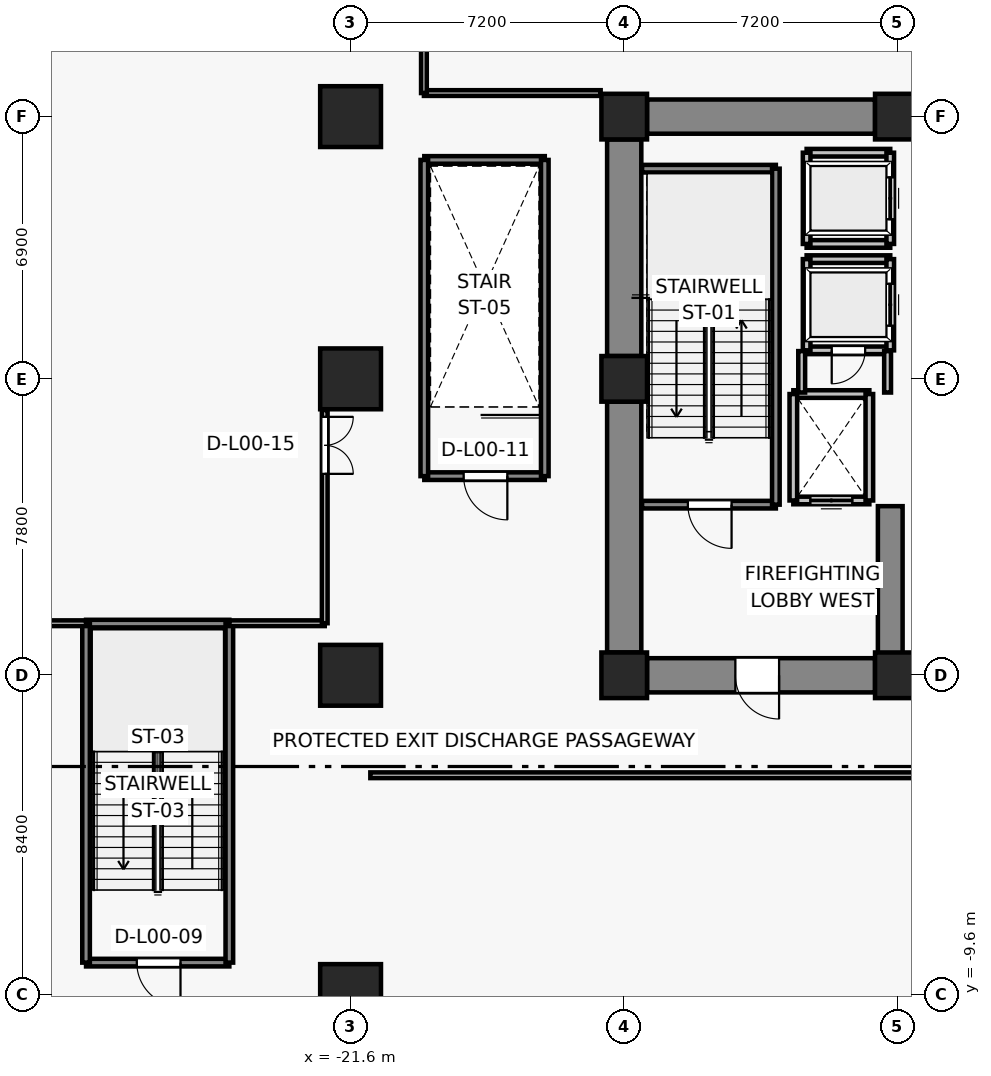
"""IFC4 building model, lengths in metres.
Left out: names, types, materials, properties, quantities, classifications, styles, units other than length and angle.
Written with IfcOpenShell. Run it as: python <this file> out.ifc"""

import sys

from ifc_helpers import new_model, si_unit, direction, frame, frame_2d, origin, origin_2d, place, context, subcontext, project, spatial, rectangle, extrude, source, transform, mapped, element, fill, save


model = new_model("IFC4")
c1 = context("Model", 3, precision=1e-05, world=origin(), true_north=direction((0.0, 1.0)))
c2 = subcontext(c1, "Body", "Model", "MODEL_VIEW")
j1 = project(units=[si_unit("LENGTHUNIT", "METRE"), si_unit("PLANEANGLEUNIT", "RADIAN")], contexts=[c1])
p1 = place(None, origin())
s1 = spatial("IfcSite", under=j1, at=p1, CompositionType="ELEMENT")
p2 = place(p1, origin())
s2 = spatial("IfcBuilding", under=s1, at=p2, CompositionType="ELEMENT")
p3 = place(p2, origin())
s3 = spatial("IfcBuildingStorey", under=s2, at=p3, CompositionType="ELEMENT", Elevation=0.0)
for number, where, z_axis, x_axis in (
    (1, (-14.4, -1.2, 0.0), (0.0, 0.0, 1.0), (1.0, 0.0, 0.0)),
    (2, (-7.2, -1.2, 0.0), (0.0, 0.0, 1.0), (1.0, 0.0, 0.0)),
    (3, (-14.4, 6.6, 0.0), (0.0, 0.0, 1.0), (1.0, 0.0, 0.0)),
    (4, (-14.4, 13.5, 0.0), (0.0, 0.0, 1.0), (1.0, 0.0, 0.0)),
    (5, (-7.2, 13.5, 0.0), (0.0, 0.0, 1.0), (1.0, 0.0, 0.0)),
):
    element("IfcColumn", number, at=place(p3, frame(where, z_axis=z_axis, x_axis=x_axis)), inside=s3, PredefinedType="COLUMN", context=c2, shape_type="SweptSolid", body=[
        extrude(rectangle(XDim=1.2, YDim=1.2, at=origin_2d()), origin(), (0.0, 0.0, 1.0), 5.0),
    ])
for number, where, z_axis, x_axis in (
    (6, (-21.6, -9.6, 0.0), (0.0, 0.0, 1.0), (1.0, 0.0, 0.0)),
    (7, (-21.6, -1.2, 0.0), (0.0, 0.0, 1.0), (1.0, 0.0, 0.0)),
    (8, (-21.6, 6.6, 0.0), (0.0, 0.0, 1.0), (1.0, 0.0, 0.0)),
    (9, (-21.6, 13.5, 0.0), (0.0, 0.0, 1.0), (1.0, 0.0, 0.0)),
):
    element("IfcColumn", number, at=place(p3, frame(where, z_axis=z_axis, x_axis=x_axis)), inside=s3, PredefinedType="COLUMN", context=c2, shape_type="SweptSolid", body=[
        extrude(rectangle(XDim=1.6, YDim=1.6, at=origin_2d()), origin(), (0.0, 0.0, 1.0), 5.0),
    ])
p4 = place(p3, frame((-13.8, 13.5, 0.0), z_axis=(0.0, 0.0, 1.0), x_axis=(1.0, 0.0, 0.0)))
e10 = element("IfcWall", 10, at=p4, inside=s3, PredefinedType="SHEAR", context=c2, shape_type="SweptSolid", body=[
    extrude(rectangle(XDim=6.0, YDim=0.9, at=frame_2d((3.0, 0.0))), origin(), (0.0, 0.0, 1.0), 4.7),
])
p5 = place(p3, frame((-14.4, -0.6, 0.0), z_axis=(0.0, 0.0, 1.0), x_axis=(0.0, 1.0, 0.0)))
e11 = element("IfcWall", 11, at=p5, inside=s3, PredefinedType="SHEAR", context=c2, shape_type="SweptSolid", body=[
    extrude(rectangle(XDim=6.6, YDim=0.9, at=frame_2d((3.3, 0.0))), origin(), (0.0, 0.0, 1.0), 4.7),
])
p6 = place(p3, frame((-14.4, 7.2, 0.0), z_axis=(0.0, 0.0, 1.0), x_axis=(0.0, 1.0, 0.0)))
e12 = element("IfcWall", 12, at=p6, inside=s3, PredefinedType="SHEAR", context=c2, shape_type="SweptSolid", body=[
    extrude(rectangle(XDim=5.7, YDim=0.9, at=frame_2d((2.85, 0.0))), origin(), (0.0, 0.0, 1.0), 4.7),
])
p7 = place(p3, frame((-7.8, -1.2, 0.0), z_axis=(0.0, 0.0, 1.0), x_axis=(-1.0, 0.0, 0.0)))
e13 = element("IfcWall", 13, at=p7, inside=s3, PredefinedType="SHEAR", context=c2, shape_type="SweptSolid", body=[
    extrude(rectangle(XDim=6.0, YDim=0.9, at=frame_2d((3.0, 0.0))), origin(), (0.0, 0.0, 1.0), 4.7),
])
p8 = place(p7, frame((2.525, 0.0, 0.0)))
e14 = element("IfcOpeningElement", 14, at=p8, cuts=e13, PredefinedType="OPENING", context=c2, shape_type="SweptSolid", body=[
    extrude(rectangle(XDim=1.15, YDim=2.15, at=frame_2d((0.575, 1.075))), frame((0.0, 0.46, 0.0), z_axis=(0.0, -1.0, 0.0), x_axis=(1.0, 0.0, 0.0)), (0.0, 0.0, 1.0), 0.92),
])
p9 = place(p3, frame((-7.4, -0.75, 0.0), z_axis=(0.0, 0.0, 1.0), x_axis=(0.0, 1.0, 0.0)))
e15 = element("IfcWall", 15, at=p9, inside=s3, PredefinedType="SHEAR", context=c2, shape_type="SweptSolid", body=[
    extrude(rectangle(XDim=4.0, YDim=0.65, at=frame_2d((2.0, 0.0))), origin(), (0.0, 0.0, 1.0), 4.7),
])
p10 = place(p3, frame((-7.95, 3.4, 0.0), z_axis=(0.0, 0.0, 1.0), x_axis=(-1.0, 0.0, 0.0)))
e16 = element("IfcWall", 16, at=p10, inside=s3, PredefinedType="SOLIDWALL", context=c2, shape_type="SweptSolid", body=[
    extrude(rectangle(XDim=2.0, YDim=0.2, at=frame_2d((1.0, 0.0))), origin(), (0.0, 0.0, 1.0), 4.7),
])
p11 = place(p10, frame((0.45, 0.0, 0.0)))
e17 = element("IfcOpeningElement", 17, at=p11, cuts=e16, PredefinedType="OPENING", context=c2, shape_type="SweptSolid", body=[
    extrude(rectangle(XDim=1.1, YDim=2.2, at=frame_2d((0.55, 1.1))), frame((0.0, 0.11, 0.0), z_axis=(0.0, -1.0, 0.0), x_axis=(1.0, 0.0, 0.0)), (0.0, 0.0, 1.0), 0.22),
])
p12 = place(p3, frame((-9.95, 6.2, 0.0), z_axis=(0.0, 0.0, 1.0), x_axis=(1.0, 0.0, 0.0)))
e18 = element("IfcWall", 18, at=p12, inside=s3, PredefinedType="SOLIDWALL", context=c2, shape_type="SweptSolid", body=[
    extrude(rectangle(XDim=2.0, YDim=0.2, at=frame_2d((1.0, 0.0))), origin(), (0.0, 0.0, 1.0), 4.7),
])
for number, where, z_axis, x_axis in (
    (19, (-9.95, 3.4, 0.0), (0.0, 0.0, 1.0), (0.0, 1.0, 0.0)),
    (20, (-7.95, 6.2, 0.0), (0.0, 0.0, 1.0), (0.0, -1.0, 0.0)),
):
    element("IfcWall", number, at=place(p3, frame(where, z_axis=z_axis, x_axis=x_axis)), inside=s3, PredefinedType="SOLIDWALL", context=c2, shape_type="SweptSolid", body=[
        extrude(rectangle(XDim=2.8, YDim=0.2, at=frame_2d((1.4, 0.0))), origin(), (0.0, 0.0, 1.0), 4.7),
    ])
p13 = place(p3, frame((-7.4, 7.35, 0.0), z_axis=(0.0, 0.0, 1.0), x_axis=(-1.0, 0.0, 0.0)))
e21 = element("IfcWall", 21, at=p13, inside=s3, PredefinedType="SOLIDWALL", context=c2, shape_type="SweptSolid", body=[
    extrude(rectangle(XDim=2.2, YDim=0.2, at=frame_2d((1.1, 0.0))), origin(), (0.0, 0.0, 1.0), 3.79),
])
p14 = place(p13, frame((0.66, 0.0, 0.0)))
e22 = element("IfcOpeningElement", 22, at=p14, cuts=e21, PredefinedType="OPENING", context=c2, shape_type="SweptSolid", body=[
    extrude(rectangle(XDim=0.88, YDim=2.1, at=frame_2d((0.44, 1.05))), frame((0.0, 0.11, 0.0), z_axis=(0.0, -1.0, 0.0), x_axis=(1.0, 0.0, 0.0)), (0.0, 0.0, 1.0), 0.22),
])
p15 = place(p3, frame((-9.6, 9.75, 0.0), z_axis=(0.0, 0.0, 1.0), x_axis=(1.0, 0.0, 0.0)))
e23 = element("IfcWall", 23, at=p15, inside=s3, PredefinedType="SOLIDWALL", context=c2, shape_type="SweptSolid", body=[
    extrude(rectangle(XDim=2.2, YDim=0.2, at=frame_2d((1.1, 0.0))), origin(), (0.0, 0.0, 1.0), 3.79),
])
p16 = place(p3, frame((-9.6, 7.35, 0.0), z_axis=(0.0, 0.0, 1.0), x_axis=(0.0, 1.0, 0.0)))
e24 = element("IfcWall", 24, at=p16, inside=s3, PredefinedType="SOLIDWALL", context=c2, shape_type="SweptSolid", body=[
    extrude(rectangle(XDim=2.4, YDim=0.2, at=frame_2d((1.2, 0.0))), origin(), (0.0, 0.0, 1.0), 4.7),
])
p17 = place(p3, frame((-7.4, 9.75, 0.0), z_axis=(0.0, 0.0, 1.0), x_axis=(0.0, -1.0, 0.0)))
e25 = element("IfcWall", 25, at=p17, inside=s3, PredefinedType="SOLIDWALL", context=c2, shape_type="SweptSolid", body=[
    extrude(rectangle(XDim=2.4, YDim=0.2, at=frame_2d((1.2, 0.0))), origin(), (0.0, 0.0, 1.0), 3.79),
])
p18 = place(p17, frame((0.65, 0.0, 0.0)))
e26 = element("IfcOpeningElement", 26, at=p18, cuts=e25, PredefinedType="OPENING", context=c2, shape_type="SweptSolid", body=[
    extrude(rectangle(XDim=1.1, YDim=2.2, at=frame_2d((0.55, 1.1))), frame((0.0, 0.11, 0.0), z_axis=(0.0, -1.0, 0.0), x_axis=(1.0, 0.0, 0.0)), (0.0, 0.0, 1.0), 0.22),
])
for number, where, z_axis, x_axis in (
    (27, (-7.4, 10.15, 0.0), (0.0, 0.0, 1.0), (-1.0, 0.0, 0.0)),
    (28, (-9.6, 12.55, 0.0), (0.0, 0.0, 1.0), (1.0, 0.0, 0.0)),
):
    element("IfcWall", number, at=place(p3, frame(where, z_axis=z_axis, x_axis=x_axis)), inside=s3, PredefinedType="SOLIDWALL", context=c2, shape_type="SweptSolid", body=[
        extrude(rectangle(XDim=2.2, YDim=0.2, at=frame_2d((1.1, 0.0))), origin(), (0.0, 0.0, 1.0), 3.79),
    ])
p19 = place(p3, frame((-9.6, 10.15, 0.0), z_axis=(0.0, 0.0, 1.0), x_axis=(0.0, 1.0, 0.0)))
e29 = element("IfcWall", 29, at=p19, inside=s3, PredefinedType="SOLIDWALL", context=c2, shape_type="SweptSolid", body=[
    extrude(rectangle(XDim=2.4, YDim=0.2, at=frame_2d((1.2, 0.0))), origin(), (0.0, 0.0, 1.0), 4.7),
])
p20 = place(p3, frame((-7.4, 12.55, 0.0), z_axis=(0.0, 0.0, 1.0), x_axis=(0.0, -1.0, 0.0)))
e30 = element("IfcWall", 30, at=p20, inside=s3, PredefinedType="SOLIDWALL", context=c2, shape_type="SweptSolid", body=[
    extrude(rectangle(XDim=2.4, YDim=0.2, at=frame_2d((1.2, 0.0))), origin(), (0.0, 0.0, 1.0), 3.79),
])
p21 = place(p20, frame((0.65, 0.0, 0.0)))
e31 = element("IfcOpeningElement", 31, at=p21, cuts=e30, PredefinedType="OPENING", context=c2, shape_type="SweptSolid", body=[
    extrude(rectangle(XDim=1.1, YDim=2.2, at=frame_2d((0.55, 1.1))), frame((0.0, 0.11, 0.0), z_axis=(0.0, -1.0, 0.0), x_axis=(1.0, 0.0, 0.0)), (0.0, 0.0, 1.0), 0.22),
])
p22 = place(p3, frame((-10.41, 3.29, 0.0), z_axis=(0.0, 0.0, 1.0), x_axis=(-1.0, 0.0, 0.0)))
e32 = element("IfcWall", 32, at=p22, inside=s3, PredefinedType="SOLIDWALL", context=c2, shape_type="SweptSolid", body=[
    extrude(rectangle(XDim=3.52, YDim=0.2, at=frame_2d((1.76, 0.0))), origin(), (0.0, 0.0, 1.0), 4.7),
])
p23 = place(p22, frame((1.165, 0.0, 0.0)))
e33 = element("IfcOpeningElement", 33, at=p23, cuts=e32, PredefinedType="OPENING", context=c2, shape_type="SweptSolid", body=[
    extrude(rectangle(XDim=1.15, YDim=2.15, at=frame_2d((0.575, 1.075))), frame((0.0, 0.11, 0.0), z_axis=(0.0, -1.0, 0.0), x_axis=(1.0, 0.0, 0.0)), (0.0, 0.0, 1.0), 0.22),
])
p24 = place(p3, frame((-13.93, 12.13, 0.0), z_axis=(0.0, 0.0, 1.0), x_axis=(1.0, 0.0, 0.0)))
e34 = element("IfcWall", 34, at=p24, inside=s3, PredefinedType="SOLIDWALL", context=c2, shape_type="SweptSolid", body=[
    extrude(rectangle(XDim=3.52, YDim=0.2, at=frame_2d((1.76, 0.0))), origin(), (0.0, 0.0, 1.0), 4.7),
])
p25 = place(p3, frame((-10.41, 12.13, 0.0), z_axis=(0.0, 0.0, 1.0), x_axis=(0.0, -1.0, 0.0)))
e35 = element("IfcWall", 35, at=p25, inside=s3, PredefinedType="SOLIDWALL", context=c2, shape_type="SweptSolid", body=[
    extrude(rectangle(XDim=8.84, YDim=0.2, at=frame_2d((4.42, 0.0))), origin(), (0.0, 0.0, 1.0), 4.7),
])
p26 = place(p3, frame((-9.73, 6.24, 0.0), z_axis=(0.0, 0.0, 1.0), x_axis=(0.0, 1.0, 0.0)))
e36 = element("IfcWall", 36, at=p26, inside=s3, PredefinedType="PARTITIONING", context=c2, shape_type="SweptSolid", body=[
    extrude(rectangle(XDim=1.09, YDim=0.18, at=frame_2d((0.545, 0.0))), origin(), (0.0, 0.0, 1.0), 4.7),
])
p27 = place(p3, frame((-7.47, 7.33, 0.0), z_axis=(0.0, 0.0, 1.0), x_axis=(0.0, -1.0, 0.0)))
e37 = element("IfcWall", 37, at=p27, inside=s3, PredefinedType="PARTITIONING", context=c2, shape_type="SweptSolid", body=[
    extrude(rectangle(XDim=1.09, YDim=0.18, at=frame_2d((0.545, 0.0))), origin(), (0.0, 0.0, 1.0), 3.79),
])
p28 = place(p3, frame((-24.79, -8.76, 0.0), z_axis=(0.0, 0.0, 1.0), x_axis=(-1.0, 0.0, 0.0)))
e38 = element("IfcWall", 38, at=p28, inside=s3, PredefinedType="SOLIDWALL", context=c2, shape_type="SweptSolid", body=[
    extrude(rectangle(XDim=3.77, YDim=0.2, at=frame_2d((1.885, 0.0))), origin(), (0.0, 0.0, 1.0), 4.7),
])
p29 = place(p28, frame((1.285, 0.0, 0.0)))
e39 = element("IfcOpeningElement", 39, at=p29, cuts=e38, PredefinedType="OPENING", context=c2, shape_type="SweptSolid", body=[
    extrude(rectangle(XDim=1.15, YDim=2.15, at=frame_2d((0.575, 1.075))), frame((0.0, 0.11, 0.0), z_axis=(0.0, -1.0, 0.0), x_axis=(1.0, 0.0, 0.0)), (0.0, 0.0, 1.0), 0.22),
])
p30 = place(p3, frame((-28.56, 0.16, 0.0), z_axis=(0.0, 0.0, 1.0), x_axis=(1.0, 0.0, 0.0)))
e40 = element("IfcWall", 40, at=p30, inside=s3, PredefinedType="SOLIDWALL", context=c2, shape_type="SweptSolid", body=[
    extrude(rectangle(XDim=3.77, YDim=0.2, at=frame_2d((1.885, 0.0))), origin(), (0.0, 0.0, 1.0), 4.7),
])
for number, where, z_axis, x_axis in (
    (41, (-28.56, -8.76, 0.0), (0.0, 0.0, 1.0), (0.0, 1.0, 0.0)),
    (42, (-24.79, 0.16, 0.0), (0.0, 0.0, 1.0), (0.0, -1.0, 0.0)),
):
    element("IfcWall", number, at=place(p3, frame(where, z_axis=z_axis, x_axis=x_axis)), inside=s3, PredefinedType="SOLIDWALL", context=c2, shape_type="SweptSolid", body=[
        extrude(rectangle(XDim=8.92, YDim=0.2, at=frame_2d((4.46, 0.0))), origin(), (0.0, 0.0, 1.0), 4.7),
    ])
p31 = place(p3, frame((-16.49, 4.04, 0.0), z_axis=(0.0, 0.0, 1.0), x_axis=(-1.0, 0.0, 0.0)))
e43 = element("IfcWall", 43, at=p31, inside=s3, PredefinedType="SOLIDWALL", context=c2, shape_type="SweptSolid", body=[
    extrude(rectangle(XDim=3.17, YDim=0.2, at=frame_2d((1.585, 0.0))), origin(), (0.0, 0.0, 1.0), 4.7),
])
p32 = place(p31, frame((0.985, 0.0, 0.0)))
e44 = element("IfcOpeningElement", 44, at=p32, cuts=e43, PredefinedType="OPENING", context=c2, shape_type="SweptSolid", body=[
    extrude(rectangle(XDim=1.15, YDim=2.15, at=frame_2d((0.575, 1.075))), frame((0.0, 0.11, 0.0), z_axis=(0.0, -1.0, 0.0), x_axis=(1.0, 0.0, 0.0)), (0.0, 0.0, 1.0), 0.22),
])
p33 = place(p3, frame((-19.66, 12.36, 0.0), z_axis=(0.0, 0.0, 1.0), x_axis=(1.0, 0.0, 0.0)))
e45 = element("IfcWall", 45, at=p33, inside=s3, PredefinedType="SOLIDWALL", context=c2, shape_type="SweptSolid", body=[
    extrude(rectangle(XDim=3.17, YDim=0.2, at=frame_2d((1.585, 0.0))), origin(), (0.0, 0.0, 1.0), 4.7),
])
for number, where, z_axis, x_axis in (
    (46, (-19.66, 4.04, 0.0), (0.0, 0.0, 1.0), (0.0, 1.0, 0.0)),
    (47, (-16.49, 12.36, 0.0), (0.0, 0.0, 1.0), (0.0, -1.0, 0.0)),
):
    element("IfcWall", number, at=place(p3, frame(where, z_axis=z_axis, x_axis=x_axis)), inside=s3, PredefinedType="SOLIDWALL", context=c2, shape_type="SweptSolid", body=[
        extrude(rectangle(XDim=8.32, YDim=0.2, at=frame_2d((4.16, 0.0))), origin(), (0.0, 0.0, 1.0), 3.79),
    ])
p34 = place(p3, frame((-21.08, -3.83, 0.0), z_axis=(0.0, 0.0, 1.0), x_axis=(1.0, 0.0, 0.0)))
e48 = element("IfcWall", 48, at=p34, inside=s3, PredefinedType="PARTITIONING", context=c2, shape_type="SweptSolid", body=[
    extrude(rectangle(XDim=42.16, YDim=0.15, at=frame_2d((21.08, 0.0))), origin(), (0.0, 0.0, 1.0), 3.769),
])
p35 = place(p34, frame((20.33, 0.0, 0.0)))
e49 = element("IfcOpeningElement", 49, at=p35, cuts=e48, PredefinedType="OPENING", context=c2, shape_type="SweptSolid", body=[
    extrude(rectangle(XDim=1.5, YDim=2.2, at=frame_2d((0.75, 1.1))), frame((0.0, 0.085, 0.0), z_axis=(0.0, -1.0, 0.0), x_axis=(1.0, 0.0, 0.0)), (0.0, 0.0, 1.0), 0.17),
])
p36 = place(p3, frame((-28.56, 0.17, 0.0), z_axis=(0.0, 0.0, 1.0), x_axis=(-1.0, 0.0, 0.0)))
e50 = element("IfcWall", 50, at=p36, inside=s3, PredefinedType="PARTITIONING", context=c2, shape_type="SweptSolid", body=[
    extrude(rectangle(XDim=10.52, YDim=0.15, at=frame_2d((5.26, 0.0))), origin(), (0.0, 0.0, 1.0), 3.79),
])
p37 = place(p3, frame((-22.28, 0.17, 0.0), z_axis=(0.0, 0.0, 1.0), x_axis=(-1.0, 0.0, 0.0)))
e51 = element("IfcWall", 51, at=p37, inside=s3, PredefinedType="PARTITIONING", context=c2, shape_type="SweptSolid", body=[
    extrude(rectangle(XDim=2.51, YDim=0.15, at=frame_2d((1.255, 0.0))), origin(), (0.0, 0.0, 1.0), 4.7),
])
p38 = place(p3, frame((-22.28, 5.78, 0.0), z_axis=(0.0, 0.0, 1.0), x_axis=(0.0, -1.0, 0.0)))
e52 = element("IfcWall", 52, at=p38, inside=s3, PredefinedType="PARTITIONING", context=c2, shape_type="SweptSolid", body=[
    extrude(rectangle(XDim=5.61, YDim=0.15, at=frame_2d((2.805, 0.0))), origin(), (0.0, 0.0, 1.0), 4.073),
])
p39 = place(p38, frame((0.18, 0.0, 0.0)))
e53 = element("IfcOpeningElement", 53, at=p39, cuts=e52, PredefinedType="OPENING", context=c2, shape_type="SweptSolid", body=[
    extrude(rectangle(XDim=1.5, YDim=2.2, at=frame_2d((0.75, 1.1))), frame((0.0, 0.085, 0.0), z_axis=(0.0, -1.0, 0.0), x_axis=(1.0, 0.0, 0.0)), (0.0, 0.0, 1.0), 0.17),
])
p40 = place(p3, frame((-15.02, 14.12, 0.0), z_axis=(0.0, 0.0, 1.0), x_axis=(-1.0, 0.0, 0.0)))
e54 = element("IfcWall", 54, at=p40, inside=s3, PredefinedType="PARTITIONING", context=c2, shape_type="SweptSolid", body=[
    extrude(rectangle(XDim=4.65, YDim=0.15, at=frame_2d((2.325, 0.0))), origin(), (0.0, 0.0, 1.0), 4.7),
])
p41 = place(p3, frame((-19.67, 14.12, 0.0), z_axis=(0.0, 0.0, 1.0), x_axis=(0.0, 1.0, 0.0)))
e55 = element("IfcWall", 55, at=p41, inside=s3, PredefinedType="PARTITIONING", context=c2, shape_type="SweptSolid", body=[
    extrude(rectangle(XDim=10.76, YDim=0.15, at=frame_2d((5.38, 0.0))), origin(), (0.0, 0.0, 1.0), 3.79),
])
p42 = place(p41, frame((1.13, 0.0, 0.0)))
e56 = element("IfcOpeningElement", 56, at=p42, cuts=e55, PredefinedType="OPENING", context=c2, shape_type="SweptSolid", body=[
    extrude(rectangle(XDim=1.5, YDim=2.2, at=frame_2d((0.75, 1.1))), frame((0.0, 0.085, 0.0), z_axis=(0.0, -1.0, 0.0), x_axis=(1.0, 0.0, 0.0)), (0.0, 0.0, 1.0), 0.17),
])
m1 = source(origin(), c2, "Body", "SweptSolid", [
    extrude(rectangle(XDim=1.1, YDim=2.2, at=frame_2d((0.55, 1.1))), frame((0.0, 0.025, 0.0), z_axis=(0.0, -1.0, 0.0), x_axis=(1.0, 0.0, 0.0)), (0.0, 0.0, 1.0), 0.05),
])
p43 = place(p11, origin())
e57 = element("IfcDoor", 57, at=p43, inside=s3, OperationType="DOUBLE_DOOR_SLIDING", PredefinedType="DOOR", context=c2, shape_type="MappedRepresentation", body=[
    mapped(m1, transform((0.0, 0.0, 0.0), x_axis=(1.0, 0.0, 0.0), y_axis=(0.0, 1.0, 0.0), z_axis=(0.0, 0.0, 1.0), scale=1.0)),
])
fill(e17, e57)
p44 = place(p18, origin())
e58 = element("IfcDoor", 58, at=p44, inside=s3, OperationType="DOUBLE_DOOR_SLIDING", PredefinedType="DOOR", context=c2, shape_type="MappedRepresentation", body=[
    mapped(m1, transform((0.0, 0.0, 0.0), x_axis=(1.0, 0.0, 0.0), y_axis=(0.0, 1.0, 0.0), z_axis=(0.0, 0.0, 1.0), scale=1.0)),
])
fill(e26, e58)
p45 = place(p21, origin())
e59 = element("IfcDoor", 59, at=p45, inside=s3, OperationType="DOUBLE_DOOR_SLIDING", PredefinedType="DOOR", context=c2, shape_type="MappedRepresentation", body=[
    mapped(m1, transform((0.0, 0.0, 0.0), x_axis=(1.0, 0.0, 0.0), y_axis=(0.0, 1.0, 0.0), z_axis=(0.0, 0.0, 1.0), scale=1.0)),
])
fill(e31, e59)
m2 = source(origin(), c2, "Body", "SweptSolid", [
    extrude(rectangle(XDim=1.15, YDim=2.15, at=frame_2d((0.575, 1.075))), frame((0.0, 0.025, 0.0), z_axis=(0.0, -1.0, 0.0), x_axis=(1.0, 0.0, 0.0)), (0.0, 0.0, 1.0), 0.05),
])
p46 = place(p23, origin())
e60 = element("IfcDoor", 60, at=p46, inside=s3, OperationType="SINGLE_SWING_LEFT", PredefinedType="DOOR", context=c2, shape_type="MappedRepresentation", body=[
    mapped(m2, transform((0.0, 0.0, 0.0), x_axis=(1.0, 0.0, 0.0), y_axis=(0.0, 1.0, 0.0), z_axis=(0.0, 0.0, 1.0), scale=1.0)),
])
fill(e33, e60)
p47 = place(p8, origin())
e61 = element("IfcDoor", 61, at=p47, inside=s3, OperationType="SINGLE_SWING_LEFT", PredefinedType="DOOR", context=c2, shape_type="MappedRepresentation", body=[
    mapped(m2, transform((0.0, 0.0, 0.0), x_axis=(1.0, 0.0, 0.0), y_axis=(0.0, 1.0, 0.0), z_axis=(0.0, 0.0, 1.0), scale=1.0)),
])
fill(e14, e61)
p48 = place(p29, origin())
e62 = element("IfcDoor", 62, at=p48, inside=s3, OperationType="SINGLE_SWING_LEFT", PredefinedType="DOOR", context=c2, shape_type="MappedRepresentation", body=[
    mapped(m2, transform((0.0, 0.0, 0.0), x_axis=(1.0, 0.0, 0.0), y_axis=(0.0, 1.0, 0.0), z_axis=(0.0, 0.0, 1.0), scale=1.0)),
])
fill(e39, e62)
p49 = place(p32, origin())
e63 = element("IfcDoor", 63, at=p49, inside=s3, OperationType="SINGLE_SWING_LEFT", PredefinedType="DOOR", context=c2, shape_type="MappedRepresentation", body=[
    mapped(m2, transform((0.0, 0.0, 0.0), x_axis=(1.0, 0.0, 0.0), y_axis=(0.0, 1.0, 0.0), z_axis=(0.0, 0.0, 1.0), scale=1.0)),
])
fill(e44, e63)
m3 = source(origin(), c2, "Body", "SweptSolid", [
    extrude(rectangle(XDim=1.5, YDim=2.2, at=frame_2d((0.75, 1.1))), frame((0.0, 0.025, 0.0), z_axis=(0.0, -1.0, 0.0), x_axis=(1.0, 0.0, 0.0)), (0.0, 0.0, 1.0), 0.05),
])
p50 = place(p39, origin())
e64 = element("IfcDoor", 64, at=p50, inside=s3, OperationType="DOUBLE_DOOR_SINGLE_SWING", PredefinedType="DOOR", context=c2, shape_type="MappedRepresentation", body=[
    mapped(m3, transform((0.0, 0.0, 0.0), x_axis=(1.0, 0.0, 0.0), y_axis=(0.0, 1.0, 0.0), z_axis=(0.0, 0.0, 1.0), scale=1.0)),
])
fill(e53, e64)
m4 = source(origin(), c2, "Body", "SweptSolid", [
    extrude(rectangle(XDim=0.88, YDim=2.1, at=frame_2d((0.44, 1.05))), frame((0.0, 0.025, 0.0), z_axis=(0.0, -1.0, 0.0), x_axis=(1.0, 0.0, 0.0)), (0.0, 0.0, 1.0), 0.05),
])
p51 = place(p14, origin())
e65 = element("IfcDoor", 65, at=p51, inside=s3, OperationType="SINGLE_SWING_RIGHT", PredefinedType="DOOR", context=c2, shape_type="MappedRepresentation", body=[
    mapped(m4, transform((0.0, 0.0, 0.0), x_axis=(1.0, 0.0, 0.0), y_axis=(0.0, 1.0, 0.0), z_axis=(0.0, 0.0, 1.0), scale=1.0)),
])
fill(e22, e65)
save(model, sys.argv[1])
